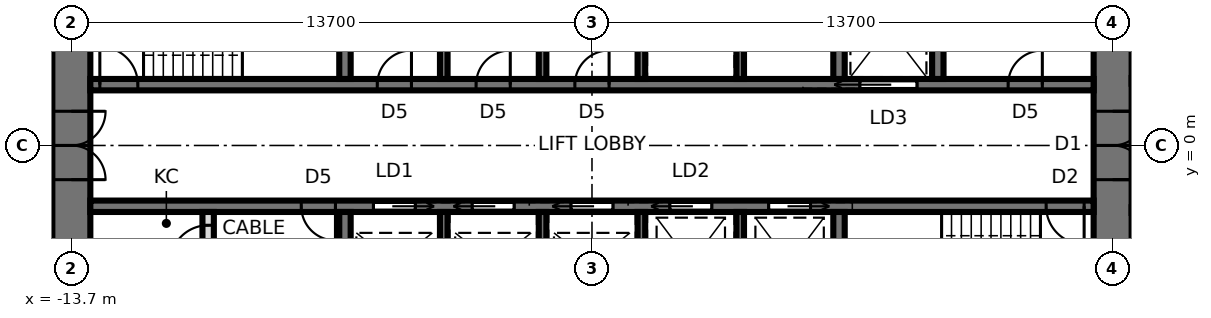
"""IFC4 building model, lengths in metres.
Left out: names, types, materials, properties, quantities, classifications, styles, units other than length and angle.
Written with IfcOpenShell. Run it as: python <this file> out.ifc"""

import sys

from ifc_helpers import new_model, si_unit, direction, frame, frame_2d, origin, place, context, subcontext, project, spatial, rectangle, extrude, element, fill, save


model = new_model("IFC4")
c1 = context("Model", 3, precision=1e-05, world=origin(), true_north=direction((0.0, 1.0)))
c2 = subcontext(c1, "Body", "Model", "MODEL_VIEW")
j1 = project(units=[si_unit("LENGTHUNIT", "METRE"), si_unit("PLANEANGLEUNIT", "RADIAN")], contexts=[c1])
p1 = place(None, origin())
s1 = spatial("IfcSite", under=j1, at=p1, CompositionType="ELEMENT")
p2 = place(p1, origin())
s2 = spatial("IfcBuilding", under=s1, at=p2, CompositionType="ELEMENT")
p3 = place(p2, frame((0.0, 0.0, 135.3)))
s3 = spatial("IfcBuildingStorey", under=s2, at=p3, CompositionType="ELEMENT", Elevation=135.3)
p4 = place(p3, frame((13.7, -9.5, 0.0), z_axis=(0.0, 0.0, 1.0), x_axis=(0.0, 1.0, 0.0)))
e1 = element("IfcWall", 1, at=p4, inside=s3, PredefinedType="SHEAR", context=c2, shape_type="SweptSolid", body=[
    extrude(rectangle(XDim=19.0, YDim=1.0, at=frame_2d((9.5, 0.0))), origin(), (0.0, 0.0, 1.0), 3.9),
])
p5 = place(p4, frame((8.6, 0.0, 0.0)))
e2 = element("IfcOpeningElement", 2, at=p5, cuts=e1, PredefinedType="OPENING", context=c2, shape_type="SweptSolid", body=[
    extrude(rectangle(XDim=1.8, YDim=2.4, at=frame_2d((0.9, 1.2))), frame((0.0, 0.51, 0.0), z_axis=(0.0, -1.0, 0.0), x_axis=(1.0, 0.0, 0.0)), (0.0, 0.0, 1.0), 1.02),
])
p6 = place(p3, frame((-13.7, 9.5, 0.0), z_axis=(0.0, 0.0, 1.0), x_axis=(0.0, -1.0, 0.0)))
e3 = element("IfcWall", 3, at=p6, inside=s3, PredefinedType="SHEAR", context=c2, shape_type="SweptSolid", body=[
    extrude(rectangle(XDim=19.0, YDim=1.0, at=frame_2d((9.5, 0.0))), origin(), (0.0, 0.0, 1.0), 3.9),
])
p7 = place(p6, frame((8.6, 0.0, 0.0)))
e4 = element("IfcOpeningElement", 4, at=p7, cuts=e3, PredefinedType="OPENING", context=c2, shape_type="SweptSolid", body=[
    extrude(rectangle(XDim=1.8, YDim=2.4, at=frame_2d((0.9, 1.2))), frame((0.0, 0.51, 0.0), z_axis=(0.0, -1.0, 0.0), x_axis=(1.0, 0.0, 0.0)), (0.0, 0.0, 1.0), 1.02),
])
p8 = place(p3, frame((-13.2, 1.6, 0.0), z_axis=(0.0, 0.0, 1.0), x_axis=(1.0, 0.0, 0.0)))
e5 = element("IfcWall", 5, at=p8, inside=s3, PredefinedType="SHEAR", context=c2, shape_type="SweptSolid", body=[
    extrude(rectangle(XDim=26.4, YDim=0.3, at=frame_2d((13.2, 0.0))), origin(), (0.0, 0.0, 1.0), 3.9),
])
p9 = place(p8, frame((0.25, 0.0, 0.0)))
e6 = element("IfcOpeningElement", 6, at=p9, cuts=e5, PredefinedType="OPENING", context=c2, shape_type="SweptSolid", body=[
    extrude(rectangle(XDim=1.0, YDim=2.1, at=frame_2d((0.5, 1.05))), frame((0.0, 0.16, 0.0), z_axis=(0.0, -1.0, 0.0), x_axis=(1.0, 0.0, 0.0)), (0.0, 0.0, 1.0), 0.32),
])
p10 = place(p8, frame((20.25, 0.0, 0.0)))
e7 = element("IfcOpeningElement", 7, at=p10, cuts=e5, PredefinedType="OPENING", context=c2, shape_type="SweptSolid", body=[
    extrude(rectangle(XDim=1.5, YDim=2.4, at=frame_2d((0.75, 1.2))), frame((0.0, 0.16, 0.0), z_axis=(0.0, -1.0, 0.0), x_axis=(1.0, 0.0, 0.0)), (0.0, 0.0, 1.0), 0.32),
])
p11 = place(p8, frame((7.55, 0.0, 0.0)))
e8 = element("IfcOpeningElement", 8, at=p11, cuts=e5, PredefinedType="OPENING", context=c2, shape_type="SweptSolid", body=[
    extrude(rectangle(XDim=0.9, YDim=2.1, at=frame_2d((0.45, 1.05))), frame((0.0, 0.16, 0.0), z_axis=(0.0, -1.0, 0.0), x_axis=(1.0, 0.0, 0.0)), (0.0, 0.0, 1.0), 0.32),
])
p12 = place(p8, frame((10.15, 0.0, 0.0)))
e9 = element("IfcOpeningElement", 9, at=p12, cuts=e5, PredefinedType="OPENING", context=c2, shape_type="SweptSolid", body=[
    extrude(rectangle(XDim=0.9, YDim=2.1, at=frame_2d((0.45, 1.05))), frame((0.0, 0.16, 0.0), z_axis=(0.0, -1.0, 0.0), x_axis=(1.0, 0.0, 0.0)), (0.0, 0.0, 1.0), 0.32),
])
p13 = place(p8, frame((12.75, 0.0, 0.0)))
e10 = element("IfcOpeningElement", 10, at=p13, cuts=e5, PredefinedType="OPENING", context=c2, shape_type="SweptSolid", body=[
    extrude(rectangle(XDim=0.9, YDim=2.1, at=frame_2d((0.45, 1.05))), frame((0.0, 0.16, 0.0), z_axis=(0.0, -1.0, 0.0), x_axis=(1.0, 0.0, 0.0)), (0.0, 0.0, 1.0), 0.32),
])
p14 = place(p8, frame((24.15, 0.0, 0.0)))
e11 = element("IfcOpeningElement", 11, at=p14, cuts=e5, PredefinedType="OPENING", context=c2, shape_type="SweptSolid", body=[
    extrude(rectangle(XDim=0.9, YDim=2.1, at=frame_2d((0.45, 1.05))), frame((0.0, 0.16, 0.0), z_axis=(0.0, -1.0, 0.0), x_axis=(1.0, 0.0, 0.0)), (0.0, 0.0, 1.0), 0.32),
])
p15 = place(p3, frame((-13.2, -1.6, 0.0), z_axis=(0.0, 0.0, 1.0), x_axis=(1.0, 0.0, 0.0)))
e12 = element("IfcWall", 12, at=p15, inside=s3, PredefinedType="SHEAR", context=c2, shape_type="SweptSolid", body=[
    extrude(rectangle(XDim=26.4, YDim=0.3, at=frame_2d((13.2, 0.0))), origin(), (0.0, 0.0, 1.0), 3.9),
])
p16 = place(p15, frame((25.15, 0.0, 0.0)))
e13 = element("IfcOpeningElement", 13, at=p16, cuts=e12, PredefinedType="OPENING", context=c2, shape_type="SweptSolid", body=[
    extrude(rectangle(XDim=1.0, YDim=2.1, at=frame_2d((0.5, 1.05))), frame((0.0, 0.16, 0.0), z_axis=(0.0, -1.0, 0.0), x_axis=(1.0, 0.0, 0.0)), (0.0, 0.0, 1.0), 0.32),
])
p17 = place(p15, frame((7.45, 0.0, 0.0)))
e14 = element("IfcOpeningElement", 14, at=p17, cuts=e12, PredefinedType="OPENING", context=c2, shape_type="SweptSolid", body=[
    extrude(rectangle(XDim=1.1, YDim=2.3, at=frame_2d((0.55, 1.15))), frame((0.0, 0.16, 0.0), z_axis=(0.0, -1.0, 0.0), x_axis=(1.0, 0.0, 0.0)), (0.0, 0.0, 1.0), 0.32),
])
p18 = place(p15, frame((10.05, 0.0, 0.0)))
e15 = element("IfcOpeningElement", 15, at=p18, cuts=e12, PredefinedType="OPENING", context=c2, shape_type="SweptSolid", body=[
    extrude(rectangle(XDim=1.1, YDim=2.3, at=frame_2d((0.55, 1.15))), frame((0.0, 0.16, 0.0), z_axis=(0.0, -1.0, 0.0), x_axis=(1.0, 0.0, 0.0)), (0.0, 0.0, 1.0), 0.32),
])
p19 = place(p15, frame((12.65, 0.0, 0.0)))
e16 = element("IfcOpeningElement", 16, at=p19, cuts=e12, PredefinedType="OPENING", context=c2, shape_type="SweptSolid", body=[
    extrude(rectangle(XDim=1.1, YDim=2.3, at=frame_2d((0.55, 1.15))), frame((0.0, 0.16, 0.0), z_axis=(0.0, -1.0, 0.0), x_axis=(1.0, 0.0, 0.0)), (0.0, 0.0, 1.0), 0.32),
])
p20 = place(p15, frame((15.25, 0.0, 0.0)))
e17 = element("IfcOpeningElement", 17, at=p20, cuts=e12, PredefinedType="OPENING", context=c2, shape_type="SweptSolid", body=[
    extrude(rectangle(XDim=1.1, YDim=2.3, at=frame_2d((0.55, 1.15))), frame((0.0, 0.16, 0.0), z_axis=(0.0, -1.0, 0.0), x_axis=(1.0, 0.0, 0.0)), (0.0, 0.0, 1.0), 0.32),
])
p21 = place(p15, frame((17.85, 0.0, 0.0)))
e18 = element("IfcOpeningElement", 18, at=p21, cuts=e12, PredefinedType="OPENING", context=c2, shape_type="SweptSolid", body=[
    extrude(rectangle(XDim=1.1, YDim=2.3, at=frame_2d((0.55, 1.15))), frame((0.0, 0.16, 0.0), z_axis=(0.0, -1.0, 0.0), x_axis=(1.0, 0.0, 0.0)), (0.0, 0.0, 1.0), 0.32),
])
p22 = place(p15, frame((5.55, 0.0, 0.0)))
e19 = element("IfcOpeningElement", 19, at=p22, cuts=e12, PredefinedType="OPENING", context=c2, shape_type="SweptSolid", body=[
    extrude(rectangle(XDim=0.9, YDim=2.1, at=frame_2d((0.45, 1.05))), frame((0.0, 0.16, 0.0), z_axis=(0.0, -1.0, 0.0), x_axis=(1.0, 0.0, 0.0)), (0.0, 0.0, 1.0), 0.32),
])
for number, where, z_axis, x_axis in (
    (20, (-6.5, 1.75, 0.0), (0.0, 0.0, 1.0), (0.0, 1.0, 0.0)),
    (21, (6.5, 1.75, 0.0), (0.0, 0.0, 1.0), (0.0, 1.0, 0.0)),
):
    element("IfcWall", number, at=place(p3, frame(where, z_axis=z_axis, x_axis=x_axis)), inside=s3, PredefinedType="SHEAR", context=c2, shape_type="SweptSolid", body=[
        extrude(rectangle(XDim=2.7, YDim=0.3, at=frame_2d((1.35, 0.0))), origin(), (0.0, 0.0, 1.0), 3.9),
    ])
for number, where, z_axis, x_axis in (
    (22, (-3.9, 1.75, 0.0), (0.0, 0.0, 1.0), (0.0, 1.0, 0.0)),
    (23, (-1.3, 1.75, 0.0), (0.0, 0.0, 1.0), (0.0, 1.0, 0.0)),
    (24, (1.3, 1.75, 0.0), (0.0, 0.0, 1.0), (0.0, 1.0, 0.0)),
    (25, (3.9, 1.75, 0.0), (0.0, 0.0, 1.0), (0.0, 1.0, 0.0)),
):
    element("IfcWall", number, at=place(p3, frame(where, z_axis=z_axis, x_axis=x_axis)), inside=s3, PredefinedType="SHEAR", context=c2, shape_type="SweptSolid", body=[
        extrude(rectangle(XDim=2.7, YDim=0.2, at=frame_2d((1.35, 0.0))), origin(), (0.0, 0.0, 1.0), 3.9),
    ])
for number, where, z_axis, x_axis in (
    (26, (-6.5, -1.75, 0.0), (0.0, 0.0, 1.0), (0.0, -1.0, 0.0)),
    (27, (6.5, -1.75, 0.0), (0.0, 0.0, 1.0), (0.0, -1.0, 0.0)),
):
    element("IfcWall", number, at=place(p3, frame(where, z_axis=z_axis, x_axis=x_axis)), inside=s3, PredefinedType="SHEAR", context=c2, shape_type="SweptSolid", body=[
        extrude(rectangle(XDim=2.7, YDim=0.3, at=frame_2d((1.35, 0.0))), origin(), (0.0, 0.0, 1.0), 3.9),
    ])
for number, where, z_axis, x_axis in (
    (28, (-3.9, -1.75, 0.0), (0.0, 0.0, 1.0), (0.0, -1.0, 0.0)),
    (29, (-1.3, -1.75, 0.0), (0.0, 0.0, 1.0), (0.0, -1.0, 0.0)),
    (30, (1.3, -1.75, 0.0), (0.0, 0.0, 1.0), (0.0, -1.0, 0.0)),
    (31, (3.9, -1.75, 0.0), (0.0, 0.0, 1.0), (0.0, -1.0, 0.0)),
):
    element("IfcWall", number, at=place(p3, frame(where, z_axis=z_axis, x_axis=x_axis)), inside=s3, PredefinedType="SHEAR", context=c2, shape_type="SweptSolid", body=[
        extrude(rectangle(XDim=2.7, YDim=0.2, at=frame_2d((1.35, 0.0))), origin(), (0.0, 0.0, 1.0), 3.9),
    ])
p23 = place(p3, frame((9.1, 1.75, 0.0), z_axis=(0.0, 0.0, 1.0), x_axis=(0.0, 1.0, 0.0)))
e32 = element("IfcWall", 32, at=p23, inside=s3, PredefinedType="SHEAR", context=c2, shape_type="SweptSolid", body=[
    extrude(rectangle(XDim=2.7, YDim=0.3, at=frame_2d((1.35, 0.0))), origin(), (0.0, 0.0, 1.0), 3.9),
])
p24 = place(p3, frame((-10.1, -3.25, 0.0), z_axis=(0.0, 0.0, 1.0), x_axis=(0.0, 1.0, 0.0)))
e33 = element("IfcWall", 33, at=p24, inside=s3, PredefinedType="PARTITIONING", context=c2, shape_type="SweptSolid", body=[
    extrude(rectangle(XDim=1.5, YDim=0.3, at=frame_2d((0.75, 0.0))), origin(), (0.0, 0.0, 1.0), 3.74),
])
p25 = place(p24, frame((0.15, 0.0, 0.0)))
e34 = element("IfcOpeningElement", 34, at=p25, cuts=e33, PredefinedType="OPENING", context=c2, shape_type="SweptSolid", body=[
    extrude(rectangle(XDim=1.0, YDim=2.4, at=frame_2d((0.5, 1.2))), frame((0.0, 0.16, 0.0), z_axis=(0.0, -1.0, 0.0), x_axis=(1.0, 0.0, 0.0)), (0.0, 0.0, 1.0), 0.32),
])
p26 = place(p3, frame((14.2, -1.7, 0.0), z_axis=(0.0, 0.0, 1.0), x_axis=(1.0, 0.0, 0.0)))
e35 = element("IfcWall", 35, at=p26, inside=s3, PredefinedType="PARTITIONING", context=c2, shape_type="SweptSolid", body=[
    extrude(rectangle(XDim=4.8, YDim=0.15, at=frame_2d((2.4, 0.0))), origin(), (0.0, 0.0, 1.0), 3.74),
])
p27 = place(p7, origin())
e36 = element("IfcDoor", 36, at=p27, inside=s3, OperationType="DOUBLE_DOOR_SINGLE_SWING", PredefinedType="DOOR", context=c2, shape_type="SweptSolid", body=[
    extrude(rectangle(XDim=1.72, YDim=2.36, at=frame_2d((0.9, 1.18))), frame((0.0, 0.025, 0.0), z_axis=(0.0, -1.0, 0.0), x_axis=(1.0, 0.0, 0.0)), (0.0, 0.0, 1.0), 0.05),
    extrude(rectangle(XDim=0.04, YDim=2.4, at=frame_2d((0.02, 1.2))), frame((0.0, 0.25, 0.0), z_axis=(0.0, -1.0, 0.0), x_axis=(1.0, 0.0, 0.0)), (0.0, 0.0, 1.0), 0.5),
    extrude(rectangle(XDim=0.04, YDim=2.4, at=frame_2d((1.78, 1.2))), frame((0.0, 0.25, 0.0), z_axis=(0.0, -1.0, 0.0), x_axis=(1.0, 0.0, 0.0)), (0.0, 0.0, 1.0), 0.5),
    extrude(rectangle(XDim=1.72, YDim=0.04, at=frame_2d((0.9, 2.38))), frame((0.0, 0.25, 0.0), z_axis=(0.0, -1.0, 0.0), x_axis=(1.0, 0.0, 0.0)), (0.0, 0.0, 1.0), 0.5),
])
fill(e4, e36)
p28 = place(p5, frame((1.8, 0.0, 0.0), z_axis=(0.0, 0.0, 1.0), x_axis=(-1.0, 0.0, 0.0)))
e37 = element("IfcDoor", 37, at=p28, inside=s3, OperationType="DOUBLE_DOOR_SINGLE_SWING", PredefinedType="DOOR", context=c2, shape_type="SweptSolid", body=[
    extrude(rectangle(XDim=1.72, YDim=2.36, at=frame_2d((0.9, 1.18))), frame((0.0, 0.025, 0.0), z_axis=(0.0, -1.0, 0.0), x_axis=(1.0, 0.0, 0.0)), (0.0, 0.0, 1.0), 0.05),
    extrude(rectangle(XDim=0.04, YDim=2.4, at=frame_2d((1.78, 1.2))), frame((0.0, 0.25, 0.0), z_axis=(0.0, -1.0, 0.0), x_axis=(1.0, 0.0, 0.0)), (0.0, 0.0, 1.0), 0.5),
    extrude(rectangle(XDim=0.04, YDim=2.4, at=frame_2d((0.02, 1.2))), frame((0.0, 0.25, 0.0), z_axis=(0.0, -1.0, 0.0), x_axis=(1.0, 0.0, 0.0)), (0.0, 0.0, 1.0), 0.5),
    extrude(rectangle(XDim=1.72, YDim=0.04, at=frame_2d((0.9, 2.38))), frame((0.0, 0.25, 0.0), z_axis=(0.0, -1.0, 0.0), x_axis=(1.0, 0.0, 0.0)), (0.0, 0.0, 1.0), 0.5),
])
fill(e2, e37)
p29 = place(p9, origin())
e38 = element("IfcDoor", 38, at=p29, inside=s3, OperationType="SINGLE_SWING_LEFT", PredefinedType="DOOR", context=c2, shape_type="SweptSolid", body=[
    extrude(rectangle(XDim=1.0, YDim=2.1, at=frame_2d((0.5, 1.05))), frame((0.0, 0.025, 0.0), z_axis=(0.0, -1.0, 0.0), x_axis=(1.0, 0.0, 0.0)), (0.0, 0.0, 1.0), 0.05),
])
fill(e6, e38)
p30 = place(p16, frame((1.0, 0.0, 0.0), z_axis=(0.0, 0.0, 1.0), x_axis=(-1.0, 0.0, 0.0)))
e39 = element("IfcDoor", 39, at=p30, inside=s3, OperationType="SINGLE_SWING_LEFT", PredefinedType="DOOR", context=c2, shape_type="SweptSolid", body=[
    extrude(rectangle(XDim=1.0, YDim=2.1, at=frame_2d((0.5, 1.05))), frame((0.0, 0.025, 0.0), z_axis=(0.0, -1.0, 0.0), x_axis=(1.0, 0.0, 0.0)), (0.0, 0.0, 1.0), 0.05),
])
fill(e13, e39)
p31 = place(p10, origin())
e40 = element("IfcDoor", 40, at=p31, inside=s3, OperationType="SLIDING_TO_LEFT", PredefinedType="DOOR", context=c2, shape_type="SweptSolid", body=[
    extrude(rectangle(XDim=1.5, YDim=2.4, at=frame_2d((0.75, 1.2))), frame((0.0, 0.025, 0.0), z_axis=(0.0, -1.0, 0.0), x_axis=(1.0, 0.0, 0.0)), (0.0, 0.0, 1.0), 0.05),
])
fill(e7, e40)
p32 = place(p11, origin())
e41 = element("IfcDoor", 41, at=p32, inside=s3, OperationType="SINGLE_SWING_RIGHT", PredefinedType="DOOR", context=c2, shape_type="SweptSolid", body=[
    extrude(rectangle(XDim=0.9, YDim=2.1, at=frame_2d((0.45, 1.05))), frame((0.0, 0.025, 0.0), z_axis=(0.0, -1.0, 0.0), x_axis=(1.0, 0.0, 0.0)), (0.0, 0.0, 1.0), 0.05),
])
fill(e8, e41)
p33 = place(p12, origin())
e42 = element("IfcDoor", 42, at=p33, inside=s3, OperationType="SINGLE_SWING_RIGHT", PredefinedType="DOOR", context=c2, shape_type="SweptSolid", body=[
    extrude(rectangle(XDim=0.9, YDim=2.1, at=frame_2d((0.45, 1.05))), frame((0.0, 0.025, 0.0), z_axis=(0.0, -1.0, 0.0), x_axis=(1.0, 0.0, 0.0)), (0.0, 0.0, 1.0), 0.05),
])
fill(e9, e42)
p34 = place(p13, origin())
e43 = element("IfcDoor", 43, at=p34, inside=s3, OperationType="SINGLE_SWING_RIGHT", PredefinedType="DOOR", context=c2, shape_type="SweptSolid", body=[
    extrude(rectangle(XDim=0.9, YDim=2.1, at=frame_2d((0.45, 1.05))), frame((0.0, 0.025, 0.0), z_axis=(0.0, -1.0, 0.0), x_axis=(1.0, 0.0, 0.0)), (0.0, 0.0, 1.0), 0.05),
])
fill(e10, e43)
p35 = place(p17, frame((1.1, 0.0, 0.0), z_axis=(0.0, 0.0, 1.0), x_axis=(-1.0, 0.0, 0.0)))
e44 = element("IfcDoor", 44, at=p35, inside=s3, OperationType="SLIDING_TO_LEFT", PredefinedType="DOOR", context=c2, shape_type="SweptSolid", body=[
    extrude(rectangle(XDim=1.1, YDim=2.3, at=frame_2d((0.55, 1.15))), frame((0.0, 0.025, 0.0), z_axis=(0.0, -1.0, 0.0), x_axis=(1.0, 0.0, 0.0)), (0.0, 0.0, 1.0), 0.05),
])
fill(e14, e44)
p36 = place(p18, frame((1.1, 0.0, 0.0), z_axis=(0.0, 0.0, 1.0), x_axis=(-1.0, 0.0, 0.0)))
e45 = element("IfcDoor", 45, at=p36, inside=s3, OperationType="SLIDING_TO_RIGHT", PredefinedType="DOOR", context=c2, shape_type="SweptSolid", body=[
    extrude(rectangle(XDim=1.1, YDim=2.3, at=frame_2d((0.55, 1.15))), frame((0.0, 0.025, 0.0), z_axis=(0.0, -1.0, 0.0), x_axis=(1.0, 0.0, 0.0)), (0.0, 0.0, 1.0), 0.05),
])
fill(e15, e45)
p37 = place(p19, frame((1.1, 0.0, 0.0), z_axis=(0.0, 0.0, 1.0), x_axis=(-1.0, 0.0, 0.0)))
e46 = element("IfcDoor", 46, at=p37, inside=s3, OperationType="SLIDING_TO_RIGHT", PredefinedType="DOOR", context=c2, shape_type="SweptSolid", body=[
    extrude(rectangle(XDim=1.1, YDim=2.3, at=frame_2d((0.55, 1.15))), frame((0.0, 0.025, 0.0), z_axis=(0.0, -1.0, 0.0), x_axis=(1.0, 0.0, 0.0)), (0.0, 0.0, 1.0), 0.05),
])
fill(e16, e46)
p38 = place(p20, frame((1.1, 0.0, 0.0), z_axis=(0.0, 0.0, 1.0), x_axis=(-1.0, 0.0, 0.0)))
e47 = element("IfcDoor", 47, at=p38, inside=s3, OperationType="SLIDING_TO_RIGHT", PredefinedType="DOOR", context=c2, shape_type="SweptSolid", body=[
    extrude(rectangle(XDim=1.1, YDim=2.3, at=frame_2d((0.55, 1.15))), frame((0.0, 0.025, 0.0), z_axis=(0.0, -1.0, 0.0), x_axis=(1.0, 0.0, 0.0)), (0.0, 0.0, 1.0), 0.05),
])
fill(e17, e47)
p39 = place(p21, frame((1.1, 0.0, 0.0), z_axis=(0.0, 0.0, 1.0), x_axis=(-1.0, 0.0, 0.0)))
e48 = element("IfcDoor", 48, at=p39, inside=s3, OperationType="SLIDING_TO_LEFT", PredefinedType="DOOR", context=c2, shape_type="SweptSolid", body=[
    extrude(rectangle(XDim=1.1, YDim=2.3, at=frame_2d((0.55, 1.15))), frame((0.0, 0.025, 0.0), z_axis=(0.0, -1.0, 0.0), x_axis=(1.0, 0.0, 0.0)), (0.0, 0.0, 1.0), 0.05),
])
fill(e18, e48)
p40 = place(p14, origin())
e49 = element("IfcDoor", 49, at=p40, inside=s3, OperationType="SINGLE_SWING_RIGHT", PredefinedType="DOOR", context=c2, shape_type="SweptSolid", body=[
    extrude(rectangle(XDim=0.9, YDim=2.1, at=frame_2d((0.45, 1.05))), frame((0.0, 0.025, 0.0), z_axis=(0.0, -1.0, 0.0), x_axis=(1.0, 0.0, 0.0)), (0.0, 0.0, 1.0), 0.05),
])
fill(e11, e49)
p41 = place(p22, frame((0.9, 0.0, 0.0), z_axis=(0.0, 0.0, 1.0), x_axis=(-1.0, 0.0, 0.0)))
e50 = element("IfcDoor", 50, at=p41, inside=s3, OperationType="SINGLE_SWING_LEFT", PredefinedType="DOOR", context=c2, shape_type="SweptSolid", body=[
    extrude(rectangle(XDim=0.9, YDim=2.1, at=frame_2d((0.45, 1.05))), frame((0.0, 0.025, 0.0), z_axis=(0.0, -1.0, 0.0), x_axis=(1.0, 0.0, 0.0)), (0.0, 0.0, 1.0), 0.05),
])
fill(e19, e50)
p42 = place(p25, origin())
e51 = element("IfcDoor", 51, at=p42, inside=s3, OperationType="SINGLE_SWING_LEFT", PredefinedType="DOOR", context=c2, shape_type="SweptSolid", body=[
    extrude(rectangle(XDim=1.0, YDim=2.4, at=frame_2d((0.5, 1.2))), frame((0.0, 0.025, 0.0), z_axis=(0.0, -1.0, 0.0), x_axis=(1.0, 0.0, 0.0)), (0.0, 0.0, 1.0), 0.05),
])
fill(e34, e51)
save(model, sys.argv[1])
